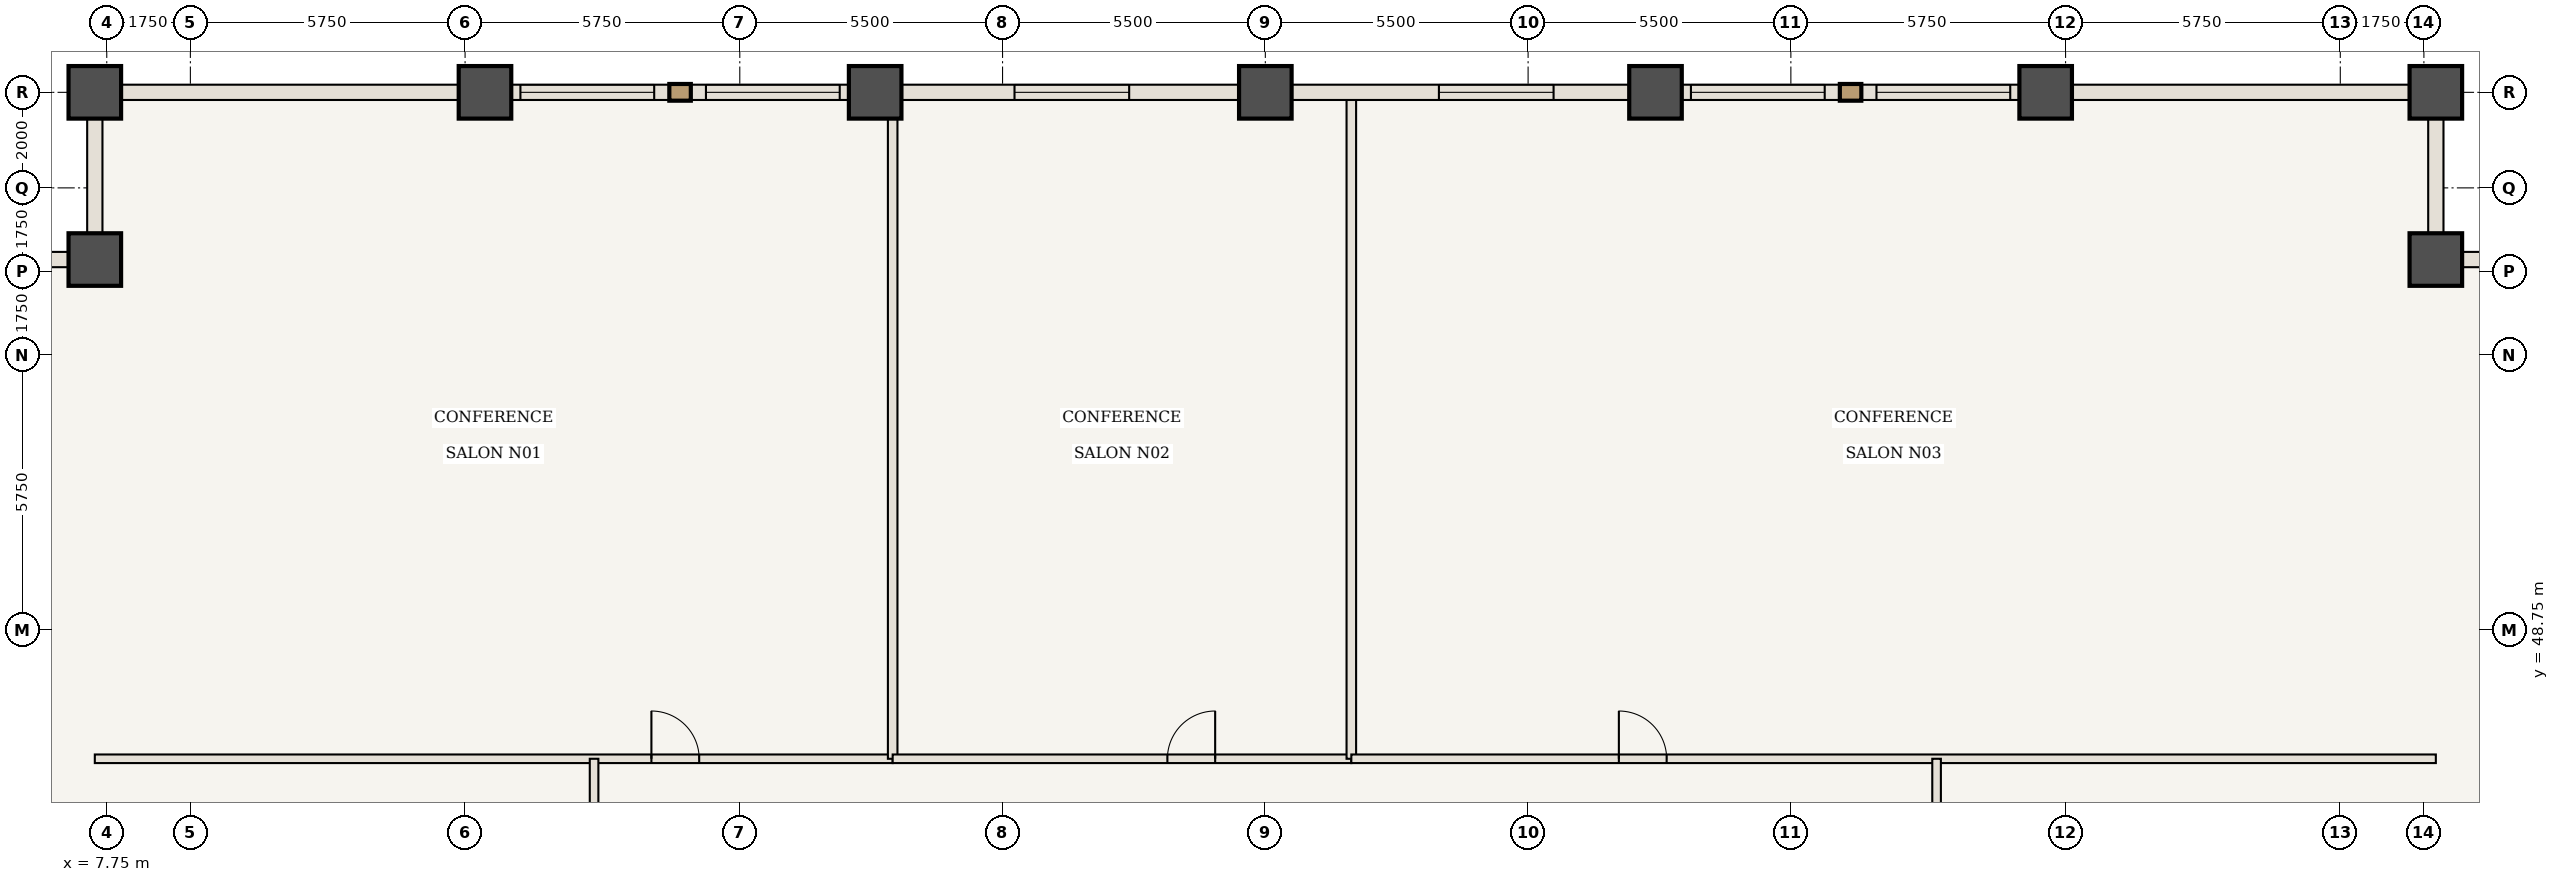
"""IFC4 building model, lengths in metres.
Left out: names, types, materials, properties, quantities, classifications, styles, units other than length and angle.
Written with IfcOpenShell. Run it as: python <this file> out.ifc"""

import sys

from ifc_helpers import new_model, si_unit, direction, frame, frame_2d, origin, origin_2d, place, context, subcontext, project, spatial, rectangle, extrude, element, fill, save


model = new_model("IFC4")
c1 = context("Model", 3, precision=1e-05, world=origin(), true_north=direction((0.0, 1.0)))
c2 = subcontext(c1, "Body", "Model", "MODEL_VIEW")
j1 = project(units=[si_unit("LENGTHUNIT", "METRE"), si_unit("PLANEANGLEUNIT", "RADIAN")], contexts=[c1])
p1 = place(None, origin())
s1 = spatial("IfcSite", under=j1, at=p1, CompositionType="ELEMENT")
p2 = place(p1, origin())
s2 = spatial("IfcBuilding", under=s1, at=p2, CompositionType="ELEMENT")
p3 = place(p2, frame((0.0, 0.0, 73.85)))
s3 = spatial("IfcBuildingStorey", under=s2, at=p3, CompositionType="ELEMENT", Elevation=73.85)
for number, where, z_axis, x_axis in (
    (1, (56.5, 56.5, 0.0), (0.0, 0.0, 1.0), (1.0, 0.0, 0.0)),
    (2, (56.5, 60.0, 0.0), (0.0, 0.0, 1.0), (1.0, 0.0, 0.0)),
    (3, (7.5, 60.0, 0.0), (0.0, 0.0, 1.0), (1.0, 0.0, 0.0)),
    (4, (7.5, 56.5, 0.0), (0.0, 0.0, 1.0), (1.0, 0.0, 0.0)),
    (5, (15.667, 60.0, 0.0), (0.0, 0.0, 1.0), (1.0, 0.0, 0.0)),
    (6, (23.833, 60.0, 0.0), (0.0, 0.0, 1.0), (1.0, 0.0, 0.0)),
    (7, (32.0, 60.0, 0.0), (0.0, 0.0, 1.0), (1.0, 0.0, 0.0)),
    (8, (40.167, 60.0, 0.0), (0.0, 0.0, 1.0), (1.0, 0.0, 0.0)),
    (9, (48.333, 60.0, 0.0), (0.0, 0.0, 1.0), (1.0, 0.0, 0.0)),
):
    element("IfcColumn", number, at=place(p3, frame(where, z_axis=z_axis, x_axis=x_axis)), inside=s3, PredefinedType="COLUMN", context=c2, shape_type="SweptSolid", body=[
        extrude(rectangle(XDim=1.1, YDim=1.1, at=origin_2d()), origin(), (0.0, 0.0, 1.0), 3.5),
    ])
p4 = place(p3, frame((7.5, 46.05, 0.0), z_axis=(0.0, 0.0, 1.0), x_axis=(1.0, 0.0, 0.0)))
e10 = element("IfcWall", 10, at=p4, inside=s3, PredefinedType="STANDARD", context=c2, shape_type="SweptSolid", body=[
    extrude(rectangle(XDim=16.7, YDim=0.18, at=frame_2d((8.35, 0.0))), origin(), (0.0, 0.0, 1.0), 3.24),
])
p5 = place(p4, frame((11.65, 0.0, 0.0)))
e11 = element("IfcOpeningElement", 11, at=p5, cuts=e10, PredefinedType="OPENING", context=c2, shape_type="SweptSolid", body=[
    extrude(rectangle(XDim=1.0, YDim=2.15, at=frame_2d((0.5, 1.075))), frame((0.0, 0.1, 0.0), z_axis=(0.0, -1.0, 0.0), x_axis=(1.0, 0.0, 0.0)), (0.0, 0.0, 1.0), 0.2),
])
p6 = place(p3, frame((24.2, 46.05, 0.0), z_axis=(0.0, 0.0, 1.0), x_axis=(0.0, 1.0, 0.0)))
e12 = element("IfcWall", 12, at=p6, inside=s3, PredefinedType="STANDARD", context=c2, shape_type="SweptSolid", body=[
    extrude(rectangle(XDim=13.89, YDim=0.2, at=frame_2d((6.945, 0.0))), origin(), (0.0, 0.0, 1.0), 3.24),
])
p7 = place(p3, frame((24.2, 46.05, 0.0), z_axis=(0.0, 0.0, 1.0), x_axis=(1.0, 0.0, 0.0)))
e13 = element("IfcWall", 13, at=p7, inside=s3, PredefinedType="STANDARD", context=c2, shape_type="SweptSolid", body=[
    extrude(rectangle(XDim=9.6, YDim=0.18, at=frame_2d((4.8, 0.0))), origin(), (0.0, 0.0, 1.0), 3.24),
])
p8 = place(p7, frame((5.75, 0.0, 0.0)))
e14 = element("IfcOpeningElement", 14, at=p8, cuts=e13, PredefinedType="OPENING", context=c2, shape_type="SweptSolid", body=[
    extrude(rectangle(XDim=1.0, YDim=2.15, at=frame_2d((0.5, 1.075))), frame((0.0, 0.1, 0.0), z_axis=(0.0, -1.0, 0.0), x_axis=(1.0, 0.0, 0.0)), (0.0, 0.0, 1.0), 0.2),
])
p9 = place(p3, frame((33.8, 46.05, 0.0), z_axis=(0.0, 0.0, 1.0), x_axis=(0.0, 1.0, 0.0)))
e15 = element("IfcWall", 15, at=p9, inside=s3, PredefinedType="STANDARD", context=c2, shape_type="SweptSolid", body=[
    extrude(rectangle(XDim=13.89, YDim=0.2, at=frame_2d((6.945, 0.0))), origin(), (0.0, 0.0, 1.0), 3.24),
])
p10 = place(p3, frame((33.8, 46.05, 0.0), z_axis=(0.0, 0.0, 1.0), x_axis=(1.0, 0.0, 0.0)))
e16 = element("IfcWall", 16, at=p10, inside=s3, PredefinedType="STANDARD", context=c2, shape_type="SweptSolid", body=[
    extrude(rectangle(XDim=22.7, YDim=0.18, at=frame_2d((11.35, 0.0))), origin(), (0.0, 0.0, 1.0), 3.24),
])
p11 = place(p10, frame((5.6, 0.0, 0.0)))
e17 = element("IfcOpeningElement", 17, at=p11, cuts=e16, PredefinedType="OPENING", context=c2, shape_type="SweptSolid", body=[
    extrude(rectangle(XDim=1.0, YDim=2.15, at=frame_2d((0.5, 1.075))), frame((0.0, 0.1, 0.0), z_axis=(0.0, -1.0, 0.0), x_axis=(1.0, 0.0, 0.0)), (0.0, 0.0, 1.0), 0.2),
])
p12 = place(p3, frame((17.95, 33.5, 0.0), z_axis=(0.0, 0.0, 1.0), x_axis=(0.0, 1.0, 0.0)))
e18 = element("IfcWall", 18, at=p12, inside=s3, PredefinedType="STANDARD", context=c2, shape_type="SweptSolid", body=[
    extrude(rectangle(XDim=12.55, YDim=0.18, at=frame_2d((6.275, 0.0))), origin(), (0.0, 0.0, 1.0), 3.24),
])
p13 = place(p12, frame((5.775, 0.0, 0.0)))
e19 = element("IfcOpeningElement", 19, at=p13, cuts=e18, PredefinedType="OPENING", context=c2, shape_type="SweptSolid", body=[
    extrude(rectangle(XDim=1.0, YDim=2.15, at=frame_2d((0.5, 1.075))), frame((0.0, 0.1, 0.0), z_axis=(0.0, -1.0, 0.0), x_axis=(1.0, 0.0, 0.0)), (0.0, 0.0, 1.0), 0.2),
])
p14 = place(p3, frame((46.05, 41.9, 0.0), z_axis=(0.0, 0.0, 1.0), x_axis=(0.0, 1.0, 0.0)))
e20 = element("IfcWall", 20, at=p14, inside=s3, PredefinedType="STANDARD", context=c2, shape_type="SweptSolid", body=[
    extrude(rectangle(XDim=4.15, YDim=0.18, at=frame_2d((2.075, 0.0))), origin(), (0.0, 0.0, 1.0), 3.24),
])
p15 = place(p14, frame((1.575, 0.0, 0.0)))
e21 = element("IfcOpeningElement", 21, at=p15, cuts=e20, PredefinedType="OPENING", context=c2, shape_type="SweptSolid", body=[
    extrude(rectangle(XDim=1.0, YDim=2.15, at=frame_2d((0.5, 1.075))), frame((0.0, 0.1, 0.0), z_axis=(0.0, -1.0, 0.0), x_axis=(1.0, 0.0, 0.0)), (0.0, 0.0, 1.0), 0.2),
])
p16 = place(p3, frame((7.5, 60.0, 0.0), z_axis=(0.0, 0.0, 1.0), x_axis=(1.0, 0.0, 0.0)))
e22 = element("IfcWall", 22, at=p16, inside=s3, PredefinedType="USERDEFINED", context=c2, shape_type="SweptSolid", body=[
    extrude(rectangle(XDim=8.167, YDim=0.32, at=frame_2d((4.083, 0.0))), origin(), (0.0, 0.0, 1.0), 2.44),
])
p17 = place(p3, frame((15.667, 60.0, 0.0), z_axis=(0.0, 0.0, 1.0), x_axis=(1.0, 0.0, 0.0)))
e23 = element("IfcWall", 23, at=p17, inside=s3, PredefinedType="USERDEFINED", context=c2, shape_type="SweptSolid", body=[
    extrude(rectangle(XDim=8.167, YDim=0.32, at=frame_2d((4.083, 0.0))), origin(), (0.0, 0.0, 1.0), 2.44),
])
p18 = place(p17, frame((0.742, 0.0, 0.85)))
e24 = element("IfcOpeningElement", 24, at=p18, cuts=e23, PredefinedType="OPENING", context=c2, shape_type="SweptSolid", body=[
    extrude(rectangle(XDim=2.8, YDim=1.39, at=frame_2d((1.4, 0.695))), frame((0.0, 0.17, 0.0), z_axis=(0.0, -1.0, 0.0), x_axis=(1.0, 0.0, 0.0)), (0.0, 0.0, 1.0), 0.34),
])
p19 = place(p17, frame((4.625, 0.0, 0.85)))
e25 = element("IfcOpeningElement", 25, at=p19, cuts=e23, PredefinedType="OPENING", context=c2, shape_type="SweptSolid", body=[
    extrude(rectangle(XDim=2.8, YDim=1.39, at=frame_2d((1.4, 0.695))), frame((0.0, 0.17, 0.0), z_axis=(0.0, -1.0, 0.0), x_axis=(1.0, 0.0, 0.0)), (0.0, 0.0, 1.0), 0.34),
])
p20 = place(p3, frame((23.833, 60.0, 0.0), z_axis=(0.0, 0.0, 1.0), x_axis=(1.0, 0.0, 0.0)))
e26 = element("IfcWall", 26, at=p20, inside=s3, PredefinedType="USERDEFINED", context=c2, shape_type="SweptSolid", body=[
    extrude(rectangle(XDim=8.167, YDim=0.32, at=frame_2d((4.083, 0.0))), origin(), (0.0, 0.0, 1.0), 2.44),
])
p21 = place(p20, frame((2.917, 0.0, 0.85)))
e27 = element("IfcOpeningElement", 27, at=p21, cuts=e26, PredefinedType="OPENING", context=c2, shape_type="SweptSolid", body=[
    extrude(rectangle(XDim=2.4, YDim=1.39, at=frame_2d((1.2, 0.695))), frame((0.0, 0.17, 0.0), z_axis=(0.0, -1.0, 0.0), x_axis=(1.0, 0.0, 0.0)), (0.0, 0.0, 1.0), 0.34),
])
p22 = place(p3, frame((32.0, 60.0, 0.0), z_axis=(0.0, 0.0, 1.0), x_axis=(1.0, 0.0, 0.0)))
e28 = element("IfcWall", 28, at=p22, inside=s3, PredefinedType="USERDEFINED", context=c2, shape_type="SweptSolid", body=[
    extrude(rectangle(XDim=8.167, YDim=0.32, at=frame_2d((4.083, 0.0))), origin(), (0.0, 0.0, 1.0), 2.44),
])
p23 = place(p22, frame((3.633, 0.0, 0.85)))
e29 = element("IfcOpeningElement", 29, at=p23, cuts=e28, PredefinedType="OPENING", context=c2, shape_type="SweptSolid", body=[
    extrude(rectangle(XDim=2.4, YDim=1.39, at=frame_2d((1.2, 0.695))), frame((0.0, 0.17, 0.0), z_axis=(0.0, -1.0, 0.0), x_axis=(1.0, 0.0, 0.0)), (0.0, 0.0, 1.0), 0.34),
])
p24 = place(p3, frame((40.167, 60.0, 0.0), z_axis=(0.0, 0.0, 1.0), x_axis=(1.0, 0.0, 0.0)))
e30 = element("IfcWall", 30, at=p24, inside=s3, PredefinedType="USERDEFINED", context=c2, shape_type="SweptSolid", body=[
    extrude(rectangle(XDim=8.167, YDim=0.32, at=frame_2d((4.083, 0.0))), origin(), (0.0, 0.0, 1.0), 2.44),
])
p25 = place(p24, frame((0.742, 0.0, 0.85)))
e31 = element("IfcOpeningElement", 31, at=p25, cuts=e30, PredefinedType="OPENING", context=c2, shape_type="SweptSolid", body=[
    extrude(rectangle(XDim=2.8, YDim=1.39, at=frame_2d((1.4, 0.695))), frame((0.0, 0.17, 0.0), z_axis=(0.0, -1.0, 0.0), x_axis=(1.0, 0.0, 0.0)), (0.0, 0.0, 1.0), 0.34),
])
p26 = place(p24, frame((4.625, 0.0, 0.85)))
e32 = element("IfcOpeningElement", 32, at=p26, cuts=e30, PredefinedType="OPENING", context=c2, shape_type="SweptSolid", body=[
    extrude(rectangle(XDim=2.8, YDim=1.39, at=frame_2d((1.4, 0.695))), frame((0.0, 0.17, 0.0), z_axis=(0.0, -1.0, 0.0), x_axis=(1.0, 0.0, 0.0)), (0.0, 0.0, 1.0), 0.34),
])
p27 = place(p3, frame((48.333, 60.0, 0.0), z_axis=(0.0, 0.0, 1.0), x_axis=(1.0, 0.0, 0.0)))
e33 = element("IfcWall", 33, at=p27, inside=s3, PredefinedType="USERDEFINED", context=c2, shape_type="SweptSolid", body=[
    extrude(rectangle(XDim=8.167, YDim=0.32, at=frame_2d((4.083, 0.0))), origin(), (0.0, 0.0, 1.0), 2.44),
])
for number, where, z_axis, x_axis in (
    (34, (56.5, 56.5, 0.0), (0.0, 0.0, 1.0), (1.0, 0.0, 0.0)),
    (35, (56.5, 60.0, 0.0), (0.0, 0.0, 1.0), (0.0, -1.0, 0.0)),
    (36, (7.5, 56.5, 0.0), (0.0, 0.0, 1.0), (0.0, 1.0, 0.0)),
    (37, (4.0, 56.5, 0.0), (0.0, 0.0, 1.0), (1.0, 0.0, 0.0)),
):
    element("IfcWall", number, at=place(p3, frame(where, z_axis=z_axis, x_axis=x_axis)), inside=s3, PredefinedType="USERDEFINED", context=c2, shape_type="SweptSolid", body=[
        extrude(rectangle(XDim=3.5, YDim=0.32, at=frame_2d((1.75, 0.0))), origin(), (0.0, 0.0, 1.0), 2.44),
    ])
p28 = place(p5, origin())
e38 = element("IfcDoor", 38, at=p28, inside=s3, OperationType="SINGLE_SWING_LEFT", PredefinedType="DOOR", context=c2, shape_type="SweptSolid", body=[
    extrude(rectangle(XDim=1.0, YDim=2.15, at=frame_2d((0.5, 1.075))), frame((0.0, 0.025, 0.0), z_axis=(0.0, -1.0, 0.0), x_axis=(1.0, 0.0, 0.0)), (0.0, 0.0, 1.0), 0.05),
])
fill(e11, e38)
p29 = place(p8, origin())
e39 = element("IfcDoor", 39, at=p29, inside=s3, OperationType="SINGLE_SWING_RIGHT", PredefinedType="DOOR", context=c2, shape_type="SweptSolid", body=[
    extrude(rectangle(XDim=1.0, YDim=2.15, at=frame_2d((0.5, 1.075))), frame((0.0, 0.025, 0.0), z_axis=(0.0, -1.0, 0.0), x_axis=(1.0, 0.0, 0.0)), (0.0, 0.0, 1.0), 0.05),
])
fill(e14, e39)
p30 = place(p11, origin())
e40 = element("IfcDoor", 40, at=p30, inside=s3, OperationType="SINGLE_SWING_LEFT", PredefinedType="DOOR", context=c2, shape_type="SweptSolid", body=[
    extrude(rectangle(XDim=1.0, YDim=2.15, at=frame_2d((0.5, 1.075))), frame((0.0, 0.025, 0.0), z_axis=(0.0, -1.0, 0.0), x_axis=(1.0, 0.0, 0.0)), (0.0, 0.0, 1.0), 0.05),
])
fill(e17, e40)
p31 = place(p18, origin())
e41 = element("IfcWindow", 41, at=p31, inside=s3, PartitioningType="SINGLE_PANEL", PredefinedType="WINDOW", context=c2, shape_type="SweptSolid", body=[
    extrude(rectangle(XDim=2.8, YDim=1.39, at=frame_2d((1.4, 0.695))), frame((0.0, 0.03, 0.0), z_axis=(0.0, -1.0, 0.0), x_axis=(1.0, 0.0, 0.0)), (0.0, 0.0, 1.0), 0.06),
])
fill(e24, e41)
p32 = place(p19, origin())
e42 = element("IfcWindow", 42, at=p32, inside=s3, PartitioningType="SINGLE_PANEL", PredefinedType="WINDOW", context=c2, shape_type="SweptSolid", body=[
    extrude(rectangle(XDim=2.8, YDim=1.39, at=frame_2d((1.4, 0.695))), frame((0.0, 0.03, 0.0), z_axis=(0.0, -1.0, 0.0), x_axis=(1.0, 0.0, 0.0)), (0.0, 0.0, 1.0), 0.06),
])
fill(e25, e42)
p33 = place(p21, origin())
e43 = element("IfcWindow", 43, at=p33, inside=s3, PartitioningType="SINGLE_PANEL", PredefinedType="WINDOW", context=c2, shape_type="SweptSolid", body=[
    extrude(rectangle(XDim=2.4, YDim=1.39, at=frame_2d((1.2, 0.695))), frame((0.0, 0.03, 0.0), z_axis=(0.0, -1.0, 0.0), x_axis=(1.0, 0.0, 0.0)), (0.0, 0.0, 1.0), 0.06),
])
fill(e27, e43)
p34 = place(p23, origin())
e44 = element("IfcWindow", 44, at=p34, inside=s3, PartitioningType="SINGLE_PANEL", PredefinedType="WINDOW", context=c2, shape_type="SweptSolid", body=[
    extrude(rectangle(XDim=2.4, YDim=1.39, at=frame_2d((1.2, 0.695))), frame((0.0, 0.03, 0.0), z_axis=(0.0, -1.0, 0.0), x_axis=(1.0, 0.0, 0.0)), (0.0, 0.0, 1.0), 0.06),
])
fill(e29, e44)
p35 = place(p25, origin())
e45 = element("IfcWindow", 45, at=p35, inside=s3, PartitioningType="SINGLE_PANEL", PredefinedType="WINDOW", context=c2, shape_type="SweptSolid", body=[
    extrude(rectangle(XDim=2.8, YDim=1.39, at=frame_2d((1.4, 0.695))), frame((0.0, 0.03, 0.0), z_axis=(0.0, -1.0, 0.0), x_axis=(1.0, 0.0, 0.0)), (0.0, 0.0, 1.0), 0.06),
])
fill(e31, e45)
p36 = place(p26, origin())
e46 = element("IfcWindow", 46, at=p36, inside=s3, PartitioningType="SINGLE_PANEL", PredefinedType="WINDOW", context=c2, shape_type="SweptSolid", body=[
    extrude(rectangle(XDim=2.8, YDim=1.39, at=frame_2d((1.4, 0.695))), frame((0.0, 0.03, 0.0), z_axis=(0.0, -1.0, 0.0), x_axis=(1.0, 0.0, 0.0)), (0.0, 0.0, 1.0), 0.06),
])
fill(e32, e46)
save(model, sys.argv[1])
